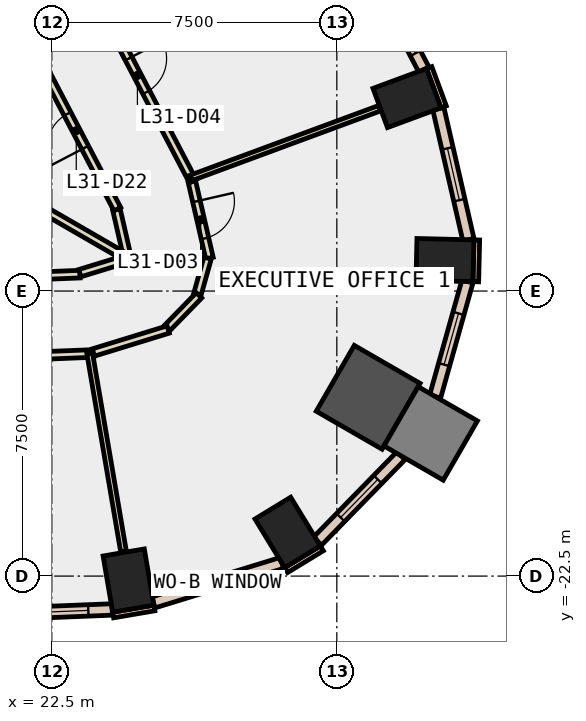
"""IFC4 building model, lengths in metres.
Left out: names, types, materials, properties, quantities, classifications, styles, units other than length and angle.
Written with IfcOpenShell. Run it as: python <this file> out.ifc"""

import sys

from ifc_helpers import new_model, si_unit, direction, frame, frame_2d, origin, origin_2d, place, context, subcontext, project, spatial, rectangle, extrude, element, fill, save


model = new_model("IFC4")
c1 = context("Model", 3, precision=1e-05, world=origin(), true_north=direction((0.0, 1.0)))
c2 = subcontext(c1, "Body", "Model", "MODEL_VIEW")
j1 = project(units=[si_unit("LENGTHUNIT", "METRE"), si_unit("PLANEANGLEUNIT", "RADIAN")], contexts=[c1])
p1 = place(None, origin())
s1 = spatial("IfcSite", under=j1, at=p1, CompositionType="ELEMENT")
p2 = place(p1, origin())
s2 = spatial("IfcBuilding", under=s1, at=p2, CompositionType="ELEMENT")
p3 = place(p2, frame((0.0, 0.0, 142.4)))
s3 = spatial("IfcBuildingStorey", under=s2, at=p3, CompositionType="ELEMENT", Elevation=142.4)
for number, where, z_axis, x_axis in (
    (1, (24.518, -22.618, -0.4), (0.0, 0.0, 1.0), (0.986, 0.168, 0.0)),
    (2, (28.707, -21.352, -0.4), (0.0, 0.0, 1.0), (0.854, 0.521, 0.0)),
):
    element("IfcColumn", number, at=place(p3, frame(where, z_axis=z_axis, x_axis=x_axis)), inside=s3, PredefinedType="COLUMN", context=c2, shape_type="SweptSolid", body=[
        extrude(rectangle(XDim=1.1, YDim=1.5, at=origin_2d()), origin(), (0.0, 0.0, 1.0), 4.2),
    ])
p4 = place(p3, frame((30.825, -17.796, -0.4), z_axis=(0.0, 0.0, 1.0), x_axis=(-0.866025403784, 0.5, 0.0)))
e3 = element("IfcColumn", 3, at=p4, inside=s3, PredefinedType="COLUMN", context=c2, shape_type="SweptSolid", body=[
    extrude(rectangle(XDim=2.0, YDim=2.0, at=origin_2d()), origin(), (0.0, 0.0, 1.0), 4.2),
])
for number, where, z_axis, x_axis in (
    (4, (32.845, -14.185, -0.4), (0.0, 0.0, 1.0), (0.024, 1.0, 0.0)),
    (5, (31.846, -9.923, -0.4), (0.0, 0.0, 1.0), (-0.347, 0.938, 0.0)),
):
    element("IfcColumn", number, at=place(p3, frame(where, z_axis=z_axis, x_axis=x_axis)), inside=s3, PredefinedType="COLUMN", context=c2, shape_type="SweptSolid", body=[
        extrude(rectangle(XDim=1.1, YDim=1.5, at=origin_2d()), origin(), (0.0, 0.0, 1.0), 4.2),
    ])
p5 = place(p3, frame((32.47, -18.746, -0.4), z_axis=(0.0, 0.0, 1.0), x_axis=(-0.866025403784, 0.5, 0.0)))
e6 = element("IfcColumn", 6, at=p5, inside=s3, PredefinedType="COLUMN", context=c2, shape_type="SweptSolid", body=[
    extrude(rectangle(XDim=1.8, YDim=1.8, at=origin_2d()), origin(), (0.0, 0.0, 1.0), 4.2),
])
p6 = place(p3, frame((32.81, -10.153, 0.0), z_axis=(0.0, 0.0, 1.0), x_axis=(-0.346425160624, 0.93807761304, 0.0)))
e7 = element("IfcWall", 7, at=p6, inside=s3, PredefinedType="STANDARD", context=c2, shape_type="SweptSolid", body=[
    extrude(rectangle(XDim=1.1, YDim=0.15, at=frame_2d((0.55, 0.0))), origin(), (0.0, 0.0, 1.0), 3.8),
])
p7 = place(p3, frame((24.114, -23.524, 0.0), z_axis=(0.0, 0.0, 1.0), x_axis=(0.985800082077, 0.167923191299, 0.0)))
e8 = element("IfcWall", 8, at=p7, inside=s3, PredefinedType="STANDARD", context=c2, shape_type="SweptSolid", body=[
    extrude(rectangle(XDim=1.101, YDim=0.15, at=frame_2d((0.55, 0.0))), origin(), (0.0, 0.0, 1.0), 3.8),
])
p8 = place(p3, frame((28.667, -22.342, 0.0), z_axis=(0.0, 0.0, 1.0), x_axis=(0.854005542721, 0.520263907071, 0.0)))
e9 = element("IfcWall", 9, at=p8, inside=s3, PredefinedType="STANDARD", context=c2, shape_type="SweptSolid", body=[
    extrude(rectangle(XDim=1.099, YDim=0.15, at=frame_2d((0.55, 0.0))), origin(), (0.0, 0.0, 1.0), 3.8),
])
p9 = place(p3, frame((33.657, -14.755, 0.0), z_axis=(0.0, 0.0, 1.0), x_axis=(0.023744690764, 0.999718055084, 0.0)))
e10 = element("IfcWall", 10, at=p9, inside=s3, PredefinedType="STANDARD", context=c2, shape_type="SweptSolid", body=[
    extrude(rectangle(XDim=1.1, YDim=0.15, at=frame_2d((0.55, 0.0))), origin(), (0.0, 0.0, 1.0), 3.8),
])
p10 = place(p3, frame((16.778, -23.67, 0.0), z_axis=(0.0, 0.0, 1.0), x_axis=(0.999203621229, 0.039901420066, 0.0)))
e11 = element("IfcWall", 11, at=p10, inside=s3, PredefinedType="STANDARD", context=c2, shape_type="SweptSolid", body=[
    extrude(rectangle(XDim=7.318, YDim=0.3, at=frame_2d((3.659, 0.0))), origin(), (0.0, 0.0, 1.0), 3.8),
])
p11 = place(p10, frame((0.629, 0.0, 0.9)))
e12 = element("IfcOpeningElement", 12, at=p11, cuts=e11, PredefinedType="OPENING", context=c2, shape_type="SweptSolid", body=[
    extrude(rectangle(XDim=2.4, YDim=2.6, at=frame_2d((1.2, 1.3))), frame((0.0, 0.16, 0.0), z_axis=(0.0, -1.0, 0.0), x_axis=(1.0, 0.0, 0.0)), (0.0, 0.0, 1.0), 0.32),
])
p12 = place(p10, frame((4.288, 0.0, 0.9)))
e13 = element("IfcOpeningElement", 13, at=p12, cuts=e11, PredefinedType="OPENING", context=c2, shape_type="SweptSolid", body=[
    extrude(rectangle(XDim=2.4, YDim=2.6, at=frame_2d((1.2, 1.3))), frame((0.0, 0.16, 0.0), z_axis=(0.0, -1.0, 0.0), x_axis=(1.0, 0.0, 0.0)), (0.0, 0.0, 1.0), 0.32),
])
p13 = place(p3, frame((25.173, -23.193, 0.0), z_axis=(0.0, 0.0, 1.0), x_axis=(0.955874475611, 0.293775402094, 0.0)))
e14 = element("IfcWall", 14, at=p13, inside=s3, PredefinedType="STANDARD", context=c2, shape_type="SweptSolid", body=[
    extrude(rectangle(XDim=3.537, YDim=0.3, at=frame_2d((1.769, 0.0))), origin(), (0.0, 0.0, 1.0), 3.8),
])
p14 = place(p13, frame((1.069, 0.0, 0.9)))
e15 = element("IfcOpeningElement", 15, at=p14, cuts=e14, PredefinedType="OPENING", context=c2, shape_type="SweptSolid", body=[
    extrude(rectangle(XDim=1.4, YDim=2.6, at=frame_2d((0.7, 1.3))), frame((0.0, 0.16, 0.0), z_axis=(0.0, -1.0, 0.0), x_axis=(1.0, 0.0, 0.0)), (0.0, 0.0, 1.0), 0.32),
])
p15 = place(p3, frame((29.491, -21.582, 0.0), z_axis=(0.0, 0.0, 1.0), x_axis=(0.698633260198, 0.715479956215, 0.0)))
e16 = element("IfcWall", 16, at=p15, inside=s3, PredefinedType="STANDARD", context=c2, shape_type="SweptSolid", body=[
    extrude(rectangle(XDim=3.145, YDim=0.3, at=frame_2d((1.572, 0.0))), origin(), (0.0, 0.0, 1.0), 3.8),
])
p16 = place(p15, frame((0.872, 0.0, 0.9)))
e17 = element("IfcOpeningElement", 17, at=p16, cuts=e16, PredefinedType="OPENING", context=c2, shape_type="SweptSolid", body=[
    extrude(rectangle(XDim=1.4, YDim=2.6, at=frame_2d((0.7, 1.3))), frame((0.0, 0.16, 0.0), z_axis=(0.0, -1.0, 0.0), x_axis=(1.0, 0.0, 0.0)), (0.0, 0.0, 1.0), 0.32),
])
p17 = place(p3, frame((32.587, -17.775, 0.0), z_axis=(0.0, 0.0, 1.0), x_axis=(0.270471130801, 0.962728085912, 0.0)))
e18 = element("IfcWall", 18, at=p17, inside=s3, PredefinedType="STANDARD", context=c2, shape_type="SweptSolid", body=[
    extrude(rectangle(XDim=3.143, YDim=0.3, at=frame_2d((1.572, 0.0))), origin(), (0.0, 0.0, 1.0), 3.8),
])
p18 = place(p17, frame((0.872, 0.0, 0.9)))
e19 = element("IfcOpeningElement", 19, at=p18, cuts=e18, PredefinedType="OPENING", context=c2, shape_type="SweptSolid", body=[
    extrude(rectangle(XDim=1.4, YDim=2.6, at=frame_2d((0.7, 1.3))), frame((0.0, 0.16, 0.0), z_axis=(0.0, -1.0, 0.0), x_axis=(1.0, 0.0, 0.0)), (0.0, 0.0, 1.0), 0.32),
])
p19 = place(p3, frame((33.463, -13.651, 0.0), z_axis=(0.0, 0.0, 1.0), x_axis=(-0.223538714932, 0.974695051247, 0.0)))
e20 = element("IfcWall", 20, at=p19, inside=s3, PredefinedType="STANDARD", context=c2, shape_type="SweptSolid", body=[
    extrude(rectangle(XDim=3.538, YDim=0.3, at=frame_2d((1.769, 0.0))), origin(), (0.0, 0.0, 1.0), 3.8),
])
p20 = place(p19, frame((1.069, 0.0, 0.9)))
e21 = element("IfcOpeningElement", 21, at=p20, cuts=e20, PredefinedType="OPENING", context=c2, shape_type="SweptSolid", body=[
    extrude(rectangle(XDim=1.4, YDim=2.6, at=frame_2d((0.7, 1.3))), frame((0.0, 0.16, 0.0), z_axis=(0.0, -1.0, 0.0), x_axis=(1.0, 0.0, 0.0)), (0.0, 0.0, 1.0), 0.32),
])
p21 = place(p3, frame((32.291, -9.173, 0.0), z_axis=(0.0, 0.0, 1.0), x_axis=(-0.463809970306, 0.885934710599, 0.0)))
e22 = element("IfcWall", 22, at=p21, inside=s3, PredefinedType="STANDARD", context=c2, shape_type="SweptSolid", body=[
    extrude(rectangle(XDim=5.927, YDim=0.3, at=frame_2d((2.963, 0.0))), origin(), (0.0, 0.0, 1.0), 3.8),
])
p22 = place(p21, frame((0.482, 0.0, 0.9)))
e23 = element("IfcOpeningElement", 23, at=p22, cuts=e22, PredefinedType="OPENING", context=c2, shape_type="SweptSolid", body=[
    extrude(rectangle(XDim=2.0, YDim=2.6, at=frame_2d((1.0, 1.3))), frame((0.0, 0.16, 0.0), z_axis=(0.0, -1.0, 0.0), x_axis=(1.0, 0.0, 0.0)), (0.0, 0.0, 1.0), 0.32),
])
p23 = place(p21, frame((3.445, 0.0, 0.9)))
e24 = element("IfcOpeningElement", 24, at=p23, cuts=e22, PredefinedType="OPENING", context=c2, shape_type="SweptSolid", body=[
    extrude(rectangle(XDim=2.0, YDim=2.6, at=frame_2d((1.0, 1.3))), frame((0.0, 0.16, 0.0), z_axis=(0.0, -1.0, 0.0), x_axis=(1.0, 0.0, 0.0)), (0.0, 0.0, 1.0), 0.32),
])
p24 = place(p3, frame((18.585, -14.741, 0.0), z_axis=(0.0, 0.0, 1.0), x_axis=(0.99920304932, 0.039915739113, 0.0)))
e25 = element("IfcWall", 25, at=p24, inside=s3, PredefinedType="PARTITIONING", context=c2, shape_type="SweptSolid", body=[
    extrude(rectangle(XDim=4.661, YDim=0.2, at=frame_2d((2.33, 0.0))), origin(), (0.0, 0.0, 1.0), 3.8),
])
p25 = place(p24, frame((1.83, 0.0, 0.0)))
e26 = element("IfcOpeningElement", 26, at=p25, cuts=e25, PredefinedType="OPENING", context=c2, shape_type="SweptSolid", body=[
    extrude(rectangle(XDim=1.0, YDim=2.1, at=frame_2d((0.5, 1.05))), frame((0.0, 0.11, 0.0), z_axis=(0.0, -1.0, 0.0), x_axis=(1.0, 0.0, 0.0)), (0.0, 0.0, 1.0), 0.22),
])
p26 = place(p3, frame((23.238, -14.529, 0.0), z_axis=(0.0, 0.0, 1.0), x_axis=(0.956086269468, 0.293085389152, 0.0)))
e27 = element("IfcWall", 27, at=p26, inside=s3, PredefinedType="PARTITIONING", context=c2, shape_type="SweptSolid", body=[
    extrude(rectangle(XDim=1.252, YDim=0.2, at=frame_2d((0.626, 0.0))), origin(), (0.0, 0.0, 1.0), 3.8),
])
p27 = place(p3, frame((24.482, -14.081, 0.0), z_axis=(0.0, 0.0, 1.0), x_axis=(-0.223967203961, 0.974596681479, 0.0)))
e28 = element("IfcWall", 28, at=p27, inside=s3, PredefinedType="PARTITIONING", context=c2, shape_type="SweptSolid", body=[
    extrude(rectangle(XDim=1.259, YDim=0.2, at=frame_2d((0.629, 0.0))), origin(), (0.0, 0.0, 1.0), 3.8),
])
p28 = place(p3, frame((24.224, -12.845, 0.0), z_axis=(0.0, 0.0, 1.0), x_axis=(-0.463819025987, 0.885929969655, 0.0)))
e29 = element("IfcWall", 29, at=p28, inside=s3, PredefinedType="PARTITIONING", context=c2, shape_type="SweptSolid", body=[
    extrude(rectangle(XDim=4.659, YDim=0.2, at=frame_2d((2.33, 0.0))), origin(), (0.0, 0.0, 1.0), 3.8),
])
p29 = place(p28, frame((1.83, 0.0, 0.0)))
e30 = element("IfcOpeningElement", 30, at=p29, cuts=e29, PredefinedType="OPENING", context=c2, shape_type="SweptSolid", body=[
    extrude(rectangle(XDim=1.0, YDim=2.1, at=frame_2d((0.5, 1.05))), frame((0.0, 0.11, 0.0), z_axis=(0.0, -1.0, 0.0), x_axis=(1.0, 0.0, 0.0)), (0.0, 0.0, 1.0), 0.22),
])
p30 = place(p3, frame((23.598, -16.642, 0.0), z_axis=(0.0, 0.0, 1.0), x_axis=(-0.999203655486, -0.039900562205, 0.0)))
e31 = element("IfcWall", 31, at=p30, inside=s3, PredefinedType="PARTITIONING", context=c2, shape_type="SweptSolid", body=[
    extrude(rectangle(XDim=7.514, YDim=0.2, at=frame_2d((3.757, 0.0))), origin(), (0.0, 0.0, 1.0), 3.8),
])
p31 = place(p30, frame((3.332, 0.0, 0.0)))
e32 = element("IfcOpeningElement", 32, at=p31, cuts=e31, PredefinedType="OPENING", context=c2, shape_type="SweptSolid", body=[
    extrude(rectangle(XDim=1.0, YDim=2.1, at=frame_2d((0.5, 1.05))), frame((0.0, 0.11, 0.0), z_axis=(0.0, -1.0, 0.0), x_axis=(1.0, 0.0, 0.0)), (0.0, 0.0, 1.0), 0.22),
])
p32 = place(p3, frame((26.186, -12.12, 0.0), z_axis=(0.0, 0.0, 1.0), x_axis=(0.224108401048, -0.974564222912, 0.0)))
e33 = element("IfcWall", 33, at=p32, inside=s3, PredefinedType="PARTITIONING", context=c2, shape_type="SweptSolid", body=[
    extrude(rectangle(XDim=2.065, YDim=0.2, at=frame_2d((1.033, 0.0))), origin(), (0.0, 0.0, 1.0), 3.8),
])
p33 = place(p32, frame((0.533, 0.0, 0.0)))
e34 = element("IfcOpeningElement", 34, at=p33, cuts=e33, PredefinedType="OPENING", context=c2, shape_type="SweptSolid", body=[
    extrude(rectangle(XDim=1.0, YDim=2.1, at=frame_2d((0.5, 1.05))), frame((0.0, 0.11, 0.0), z_axis=(0.0, -1.0, 0.0), x_axis=(1.0, 0.0, 0.0)), (0.0, 0.0, 1.0), 0.22),
])
p34 = place(p3, frame((26.599, -14.132, 0.0), z_axis=(0.0, 0.0, 1.0), x_axis=(-0.270631784819, -0.962682936925, 0.0)))
e35 = element("IfcWall", 35, at=p34, inside=s3, PredefinedType="PARTITIONING", context=c2, shape_type="SweptSolid", body=[
    extrude(rectangle(XDim=0.994, YDim=0.2, at=frame_2d((0.497, 0.0))), origin(), (0.0, 0.0, 1.0), 3.8),
])
p35 = place(p3, frame((26.373, -15.114, 0.0), z_axis=(0.0, 0.0, 1.0), x_axis=(-0.698272822523, -0.715831729756, 0.0)))
e36 = element("IfcWall", 36, at=p35, inside=s3, PredefinedType="PARTITIONING", context=c2, shape_type="SweptSolid", body=[
    extrude(rectangle(XDim=1.196, YDim=0.2, at=frame_2d((0.598, 0.0))), origin(), (0.0, 0.0, 1.0), 3.8),
])
p36 = place(p3, frame((25.563, -16.012, 0.0), z_axis=(0.0, 0.0, 1.0), x_axis=(-0.955896815358, -0.293702704087, 0.0)))
e37 = element("IfcWall", 37, at=p36, inside=s3, PredefinedType="PARTITIONING", context=c2, shape_type="SweptSolid", body=[
    extrude(rectangle(XDim=2.06, YDim=0.2, at=frame_2d((1.03, 0.0))), origin(), (0.0, 0.0, 1.0), 3.8),
])
p37 = place(p3, frame((23.294, -6.541, 0.0), z_axis=(0.0, 0.0, 1.0), x_axis=(0.463802391881, -0.885938678062, 0.0)))
e38 = element("IfcWall", 38, at=p37, inside=s3, PredefinedType="PARTITIONING", context=c2, shape_type="SweptSolid", body=[
    extrude(rectangle(XDim=6.287, YDim=0.2, at=frame_2d((3.144, 0.0))), origin(), (0.0, 0.0, 1.0), 3.8),
])
p38 = place(p37, frame((2.644, 0.0, 0.0)))
e39 = element("IfcOpeningElement", 39, at=p38, cuts=e38, PredefinedType="OPENING", context=c2, shape_type="SweptSolid", body=[
    extrude(rectangle(XDim=1.0, YDim=2.1, at=frame_2d((0.5, 1.05))), frame((0.0, 0.11, 0.0), z_axis=(0.0, -1.0, 0.0), x_axis=(1.0, 0.0, 0.0)), (0.0, 0.0, 1.0), 0.22),
])
p39 = place(p3, frame((20.31, -11.721, 0.0), z_axis=(0.0, 0.0, 1.0), x_axis=(0.86603399059, -0.499985126921, 0.0)))
e40 = element("IfcWall", 40, at=p39, inside=s3, PredefinedType="PARTITIONING", context=c2, shape_type="SweptSolid", body=[
    extrude(rectangle(XDim=4.854, YDim=0.2, at=frame_2d((2.427, 0.0))), origin(), (0.0, 0.0, 1.0), 3.8),
])
p40 = place(p3, frame((23.498, -16.646, 0.0), z_axis=(0.0, 0.0, 1.0), x_axis=(0.168275674737, -0.985739974482, 0.0)))
e41 = element("IfcWall", 41, at=p40, inside=s3, PredefinedType="PARTITIONING", context=c2, shape_type="SweptSolid", body=[
    extrude(rectangle(XDim=5.288, YDim=0.15, at=frame_2d((2.644, 0.0))), origin(), (0.0, 0.0, 1.0), 3.8),
])
p41 = place(p3, frame((26.164, -12.023, 0.0), z_axis=(0.0, 0.0, 1.0), x_axis=(0.937995804261, 0.346646608505, 0.0)))
e42 = element("IfcWall", 42, at=p41, inside=s3, PredefinedType="PARTITIONING", context=c2, shape_type="SweptSolid", body=[
    extrude(rectangle(XDim=5.288, YDim=0.15, at=frame_2d((2.644, 0.0))), origin(), (0.0, 0.0, 1.0), 3.8),
])
p42 = place(p12, origin())
e43 = element("IfcWindow", 43, at=p42, inside=s3, PartitioningType="SINGLE_PANEL", PredefinedType="WINDOW", context=c2, shape_type="SweptSolid", body=[
    extrude(rectangle(XDim=2.4, YDim=2.6, at=frame_2d((1.2, 1.3))), frame((0.0, 0.03, 0.0), z_axis=(0.0, -1.0, 0.0), x_axis=(1.0, 0.0, 0.0)), (0.0, 0.0, 1.0), 0.06),
])
fill(e13, e43)
p43 = place(p14, origin())
e44 = element("IfcWindow", 44, at=p43, inside=s3, PartitioningType="SINGLE_PANEL", PredefinedType="WINDOW", context=c2, shape_type="SweptSolid", body=[
    extrude(rectangle(XDim=1.4, YDim=2.6, at=frame_2d((0.7, 1.3))), frame((0.0, 0.03, 0.0), z_axis=(0.0, -1.0, 0.0), x_axis=(1.0, 0.0, 0.0)), (0.0, 0.0, 1.0), 0.06),
])
fill(e15, e44)
p44 = place(p16, origin())
e45 = element("IfcWindow", 45, at=p44, inside=s3, PartitioningType="SINGLE_PANEL", PredefinedType="WINDOW", context=c2, shape_type="SweptSolid", body=[
    extrude(rectangle(XDim=1.4, YDim=2.6, at=frame_2d((0.7, 1.3))), frame((0.0, 0.03, 0.0), z_axis=(0.0, -1.0, 0.0), x_axis=(1.0, 0.0, 0.0)), (0.0, 0.0, 1.0), 0.06),
])
fill(e17, e45)
p45 = place(p18, origin())
e46 = element("IfcWindow", 46, at=p45, inside=s3, PartitioningType="SINGLE_PANEL", PredefinedType="WINDOW", context=c2, shape_type="SweptSolid", body=[
    extrude(rectangle(XDim=1.4, YDim=2.6, at=frame_2d((0.7, 1.3))), frame((0.0, 0.03, 0.0), z_axis=(0.0, -1.0, 0.0), x_axis=(1.0, 0.0, 0.0)), (0.0, 0.0, 1.0), 0.06),
])
fill(e19, e46)
p46 = place(p20, origin())
e47 = element("IfcWindow", 47, at=p46, inside=s3, PartitioningType="SINGLE_PANEL", PredefinedType="WINDOW", context=c2, shape_type="SweptSolid", body=[
    extrude(rectangle(XDim=1.4, YDim=2.6, at=frame_2d((0.7, 1.3))), frame((0.0, 0.03, 0.0), z_axis=(0.0, -1.0, 0.0), x_axis=(1.0, 0.0, 0.0)), (0.0, 0.0, 1.0), 0.06),
])
fill(e21, e47)
p47 = place(p22, origin())
e48 = element("IfcWindow", 48, at=p47, inside=s3, PartitioningType="SINGLE_PANEL", PredefinedType="WINDOW", context=c2, shape_type="SweptSolid", body=[
    extrude(rectangle(XDim=2.0, YDim=2.6, at=frame_2d((1.0, 1.3))), frame((0.0, 0.03, 0.0), z_axis=(0.0, -1.0, 0.0), x_axis=(1.0, 0.0, 0.0)), (0.0, 0.0, 1.0), 0.06),
])
fill(e23, e48)
p48 = place(p33, origin())
e49 = element("IfcDoor", 49, at=p48, inside=s3, OperationType="SINGLE_SWING_LEFT", PredefinedType="DOOR", context=c2, shape_type="SweptSolid", body=[
    extrude(rectangle(XDim=1.0, YDim=2.1, at=frame_2d((0.5, 1.05))), frame((0.0, 0.025, 0.0), z_axis=(0.0, -1.0, 0.0), x_axis=(1.0, 0.0, 0.0)), (0.0, 0.0, 1.0), 0.05),
])
fill(e34, e49)
p49 = place(p38, origin())
e50 = element("IfcDoor", 50, at=p49, inside=s3, OperationType="SINGLE_SWING_LEFT", PredefinedType="DOOR", context=c2, shape_type="SweptSolid", body=[
    extrude(rectangle(XDim=1.0, YDim=2.1, at=frame_2d((0.5, 1.05))), frame((0.0, 0.025, 0.0), z_axis=(0.0, -1.0, 0.0), x_axis=(1.0, 0.0, 0.0)), (0.0, 0.0, 1.0), 0.05),
])
fill(e39, e50)
p50 = place(p29, origin())
e51 = element("IfcDoor", 51, at=p50, inside=s3, OperationType="SINGLE_SWING_LEFT", PredefinedType="DOOR", context=c2, shape_type="SweptSolid", body=[
    extrude(rectangle(XDim=1.0, YDim=2.1, at=frame_2d((0.5, 1.05))), frame((0.0, 0.025, 0.0), z_axis=(0.0, -1.0, 0.0), x_axis=(1.0, 0.0, 0.0)), (0.0, 0.0, 1.0), 0.05),
])
fill(e30, e51)
save(model, sys.argv[1])
